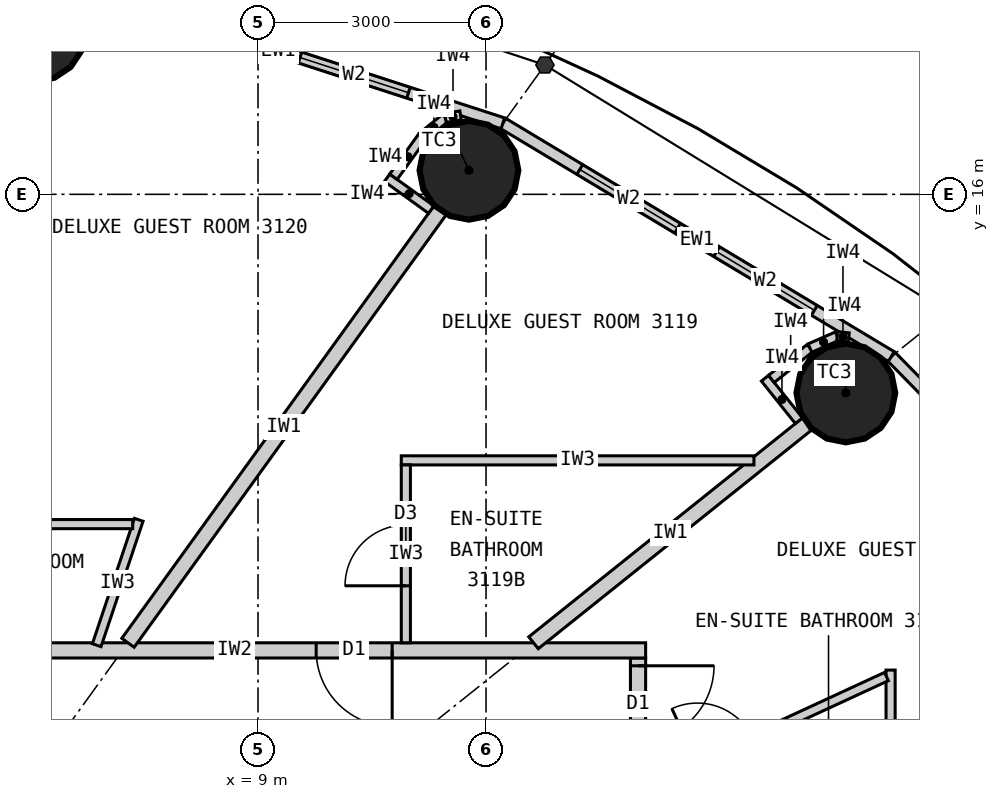
"""IFC4 building model, lengths in metres.
Left out: names, types, materials, properties, quantities, classifications, styles, units other than length and angle.
Written with IfcOpenShell. Run it as: python <this file> out.ifc"""

import sys

from ifc_helpers import new_model, si_unit, direction, frame, frame_2d, origin, origin_2d, place, context, subcontext, project, spatial, rectangle, circle, extrude, element, fill, save


model = new_model("IFC4")
c1 = context("Model", 3, precision=1e-05, world=origin(), true_north=direction((0.0, 1.0)))
c2 = subcontext(c1, "Body", "Model", "MODEL_VIEW")
j1 = project(units=[si_unit("LENGTHUNIT", "METRE"), si_unit("PLANEANGLEUNIT", "RADIAN")], contexts=[c1])
p1 = place(None, origin())
s1 = spatial("IfcSite", under=j1, at=p1, CompositionType="ELEMENT")
p2 = place(p1, origin())
s2 = spatial("IfcBuilding", under=s1, at=p2, CompositionType="ELEMENT")
p3 = place(p2, frame((0.0, 0.0, 122.1)))
s3 = spatial("IfcBuildingStorey", under=s2, at=p3, CompositionType="ELEMENT", Elevation=122.1)
for number, where, z_axis, x_axis in (
    (1, (16.734, 13.387, 0.0), (0.0, 0.0, 1.0), (1.0, 0.0, 0.0)),
    (2, (11.775, 16.316, 0.0), (0.0, 0.0, 1.0), (1.0, 0.0, 0.0)),
    (3, (6.074, 18.135, 0.0), (0.0, 0.0, 1.0), (1.0, 0.0, 0.0)),
):
    element("IfcColumn", number, at=place(p3, frame(where, z_axis=z_axis, x_axis=x_axis)), inside=s3, PredefinedType="COLUMN", context=c2, shape_type="SweptSolid", body=[
        extrude(circle(Radius=0.65, at=origin_2d()), origin(), (0.0, 0.0, 1.0), 3.3),
    ])
p4 = place(p3, frame((21.287, 9.832, 0.0), z_axis=(0.0, 0.0, 1.0), x_axis=(-0.700136650834, 0.714008872605, 0.0)))
e4 = element("IfcWall", 4, at=p4, inside=s3, PredefinedType="ELEMENTEDWALL", context=c2, shape_type="SweptSolid", body=[
    extrude(rectangle(XDim=5.649, YDim=0.15, at=frame_2d((2.825, 0.0))), origin(), (0.0, 0.0, 1.0), 3.12),
])
p5 = place(p4, frame((1.025, 0.0, 0.9)))
e5 = element("IfcOpeningElement", 5, at=p5, cuts=e4, PredefinedType="OPENING", context=c2, shape_type="SweptSolid", body=[
    extrude(rectangle(XDim=1.5, YDim=1.9, at=frame_2d((0.75, 0.95))), frame((0.0, 0.085, 0.0), z_axis=(0.0, -1.0, 0.0), x_axis=(1.0, 0.0, 0.0)), (0.0, 0.0, 1.0), 0.17),
])
p6 = place(p4, frame((3.125, 0.0, 0.9)))
e6 = element("IfcOpeningElement", 6, at=p6, cuts=e4, PredefinedType="OPENING", context=c2, shape_type="SweptSolid", body=[
    extrude(rectangle(XDim=1.5, YDim=1.9, at=frame_2d((0.75, 0.95))), frame((0.0, 0.085, 0.0), z_axis=(0.0, -1.0, 0.0), x_axis=(1.0, 0.0, 0.0)), (0.0, 0.0, 1.0), 0.17),
])
p7 = place(p3, frame((17.332, 13.866, 0.0), z_axis=(0.0, 0.0, 1.0), x_axis=(-0.857308573723, 0.514802884044, 0.0)))
e7 = element("IfcWall", 7, at=p7, inside=s3, PredefinedType="ELEMENTEDWALL", context=c2, shape_type="SweptSolid", body=[
    extrude(rectangle(XDim=5.961, YDim=0.15, at=frame_2d((2.98, 0.0))), origin(), (0.0, 0.0, 1.0), 3.12),
])
p8 = place(p7, frame((1.181, 0.0, 0.9)))
e8 = element("IfcOpeningElement", 8, at=p8, cuts=e7, PredefinedType="OPENING", context=c2, shape_type="SweptSolid", body=[
    extrude(rectangle(XDim=1.5, YDim=1.9, at=frame_2d((0.75, 0.95))), frame((0.0, 0.085, 0.0), z_axis=(0.0, -1.0, 0.0), x_axis=(1.0, 0.0, 0.0)), (0.0, 0.0, 1.0), 0.17),
])
p9 = place(p7, frame((3.281, 0.0, 0.9)))
e9 = element("IfcOpeningElement", 9, at=p9, cuts=e7, PredefinedType="OPENING", context=c2, shape_type="SweptSolid", body=[
    extrude(rectangle(XDim=1.5, YDim=1.9, at=frame_2d((0.75, 0.95))), frame((0.0, 0.085, 0.0), z_axis=(0.0, -1.0, 0.0), x_axis=(1.0, 0.0, 0.0)), (0.0, 0.0, 1.0), 0.17),
])
p10 = place(p3, frame((12.221, 16.935, 0.0), z_axis=(0.0, 0.0, 1.0), x_axis=(-0.951272691506, 0.308350881944, 0.0)))
e10 = element("IfcWall", 10, at=p10, inside=s3, PredefinedType="ELEMENTEDWALL", context=c2, shape_type="SweptSolid", body=[
    extrude(rectangle(XDim=6.211, YDim=0.15, at=frame_2d((3.105, 0.0))), origin(), (0.0, 0.0, 1.0), 3.12),
])
p11 = place(p10, frame((1.305, 0.0, 0.9)))
e11 = element("IfcOpeningElement", 11, at=p11, cuts=e10, PredefinedType="OPENING", context=c2, shape_type="SweptSolid", body=[
    extrude(rectangle(XDim=1.5, YDim=1.9, at=frame_2d((0.75, 0.95))), frame((0.0, 0.085, 0.0), z_axis=(0.0, -1.0, 0.0), x_axis=(1.0, 0.0, 0.0)), (0.0, 0.0, 1.0), 0.17),
])
p12 = place(p10, frame((3.405, 0.0, 0.9)))
e12 = element("IfcOpeningElement", 12, at=p12, cuts=e10, PredefinedType="OPENING", context=c2, shape_type="SweptSolid", body=[
    extrude(rectangle(XDim=1.5, YDim=1.9, at=frame_2d((0.75, 0.95))), frame((0.0, 0.085, 0.0), z_axis=(0.0, -1.0, 0.0), x_axis=(1.0, 0.0, 0.0)), (0.0, 0.0, 1.0), 0.17),
])
p13 = place(p3, frame((14.0, -9.9, 0.0), z_axis=(0.0, 0.0, 1.0), x_axis=(0.0, 1.0, 0.0)))
e13 = element("IfcWall", 13, at=p13, inside=s3, PredefinedType="PARTITIONING", context=c2, shape_type="SweptSolid", body=[
    extrude(rectangle(XDim=19.8, YDim=0.2, at=frame_2d((9.9, 0.0))), origin(), (0.0, 0.0, 1.0), 3.12),
])
p14 = place(p13, frame((2.478, 0.0, 0.0)))
e14 = element("IfcOpeningElement", 14, at=p14, cuts=e13, PredefinedType="OPENING", context=c2, shape_type="SweptSolid", body=[
    extrude(rectangle(XDim=1.0, YDim=2.2, at=frame_2d((0.5, 1.1))), frame((0.0, 0.11, 0.0), z_axis=(0.0, -1.0, 0.0), x_axis=(1.0, 0.0, 0.0)), (0.0, 0.0, 1.0), 0.22),
])
p15 = place(p13, frame((8.838, 0.0, 0.0)))
e15 = element("IfcOpeningElement", 15, at=p15, cuts=e13, PredefinedType="OPENING", context=c2, shape_type="SweptSolid", body=[
    extrude(rectangle(XDim=1.0, YDim=2.2, at=frame_2d((0.5, 1.1))), frame((0.0, 0.11, 0.0), z_axis=(0.0, -1.0, 0.0), x_axis=(1.0, 0.0, 0.0)), (0.0, 0.0, 1.0), 0.22),
])
p16 = place(p13, frame((13.742, 0.0, 0.0)))
e16 = element("IfcOpeningElement", 16, at=p16, cuts=e13, PredefinedType="OPENING", context=c2, shape_type="SweptSolid", body=[
    extrude(rectangle(XDim=1.0, YDim=2.2, at=frame_2d((0.5, 1.1))), frame((0.0, 0.11, 0.0), z_axis=(0.0, -1.0, 0.0), x_axis=(1.0, 0.0, 0.0)), (0.0, 0.0, 1.0), 0.22),
])
p17 = place(p13, frame((18.698, 0.0, 0.0)))
e17 = element("IfcOpeningElement", 17, at=p17, cuts=e13, PredefinedType="OPENING", context=c2, shape_type="SweptSolid", body=[
    extrude(rectangle(XDim=1.0, YDim=2.2, at=frame_2d((0.5, 1.1))), frame((0.0, 0.11, 0.0), z_axis=(0.0, -1.0, 0.0), x_axis=(1.0, 0.0, 0.0)), (0.0, 0.0, 1.0), 0.22),
])
p18 = place(p3, frame((3.283, 10.0, 0.0), z_axis=(0.0, 0.0, 1.0), x_axis=(1.0, 0.0, 0.0)))
e18 = element("IfcWall", 18, at=p18, inside=s3, PredefinedType="PARTITIONING", context=c2, shape_type="SweptSolid", body=[
    extrude(rectangle(XDim=10.817, YDim=0.2, at=frame_2d((5.409, 0.0))), origin(), (0.0, 0.0, 1.0), 3.12),
])
p19 = place(p18, frame((6.482, 0.0, 0.0)))
e19 = element("IfcOpeningElement", 19, at=p19, cuts=e18, PredefinedType="OPENING", context=c2, shape_type="SweptSolid", body=[
    extrude(rectangle(XDim=1.0, YDim=2.2, at=frame_2d((0.5, 1.1))), frame((0.0, 0.11, 0.0), z_axis=(0.0, -1.0, 0.0), x_axis=(1.0, 0.0, 0.0)), (0.0, 0.0, 1.0), 0.22),
])
p20 = place(p3, frame((14.1, 6.512, 0.0), z_axis=(0.0, 0.0, 1.0), x_axis=(0.907833019998, 0.419331858797, 0.0)))
e20 = element("IfcWall", 20, at=p20, inside=s3, PredefinedType="PARTITIONING", context=c2, shape_type="SweptSolid", body=[
    extrude(rectangle(XDim=6.505, YDim=0.2, at=frame_2d((3.252, 0.0))), origin(), (0.0, 0.0, 1.0), 2.27),
])
p21 = place(p3, frame((12.625, 10.1, 0.0), z_axis=(0.0, 0.0, 1.0), x_axis=(0.780863644897, 0.624701503182, 0.0)))
e21 = element("IfcWall", 21, at=p21, inside=s3, PredefinedType="PARTITIONING", context=c2, shape_type="SweptSolid", body=[
    extrude(rectangle(XDim=4.612, YDim=0.2, at=frame_2d((2.306, 0.0))), origin(), (0.0, 0.0, 1.0), 2.37),
])
p22 = place(p3, frame((7.289, 10.1, 0.0), z_axis=(0.0, 0.0, 1.0), x_axis=(0.585217367024, 0.81087645997, 0.0)))
e22 = element("IfcWall", 22, at=p22, inside=s3, PredefinedType="PARTITIONING", context=c2, shape_type="SweptSolid", body=[
    extrude(rectangle(XDim=7.016, YDim=0.2, at=frame_2d((3.508, 0.0))), origin(), (0.0, 0.0, 1.0), 2.37),
])
p23 = place(p3, frame((17.323, 8.101, 0.0), z_axis=(0.0, 0.0, 1.0), x_axis=(0.0, 1.0, 0.0)))
e23 = element("IfcWall", 23, at=p23, inside=s3, PredefinedType="PARTITIONING", context=c2, shape_type="SweptSolid", body=[
    extrude(rectangle(XDim=1.64, YDim=0.12, at=frame_2d((0.82, 0.0))), origin(), (0.0, 0.0, 1.0), 3.12),
])
p24 = place(p3, frame((14.1, 8.193, 0.0), z_axis=(0.0, 0.0, 1.0), x_axis=(0.907836493557, 0.419324338628, 0.0)))
e24 = element("IfcWall", 24, at=p24, inside=s3, PredefinedType="PARTITIONING", context=c2, shape_type="SweptSolid", body=[
    extrude(rectangle(XDim=3.49, YDim=0.12, at=frame_2d((1.745, 0.0))), origin(), (0.0, 0.0, 1.0), 3.12),
])
p25 = place(p24, frame((0.75, 0.0, 0.0)))
e25 = element("IfcOpeningElement", 25, at=p25, cuts=e24, PredefinedType="OPENING", context=c2, shape_type="SweptSolid", body=[
    extrude(rectangle(XDim=0.8, YDim=2.1, at=frame_2d((0.4, 1.05))), frame((0.0, 0.07, 0.0), z_axis=(0.0, -1.0, 0.0), x_axis=(1.0, 0.0, 0.0)), (0.0, 0.0, 1.0), 0.14),
])
p26 = place(p3, frame((15.525, 12.5, 0.0), z_axis=(0.0, 0.0, 1.0), x_axis=(-1.0, 0.0, 0.0)))
e26 = element("IfcWall", 26, at=p26, inside=s3, PredefinedType="PARTITIONING", context=c2, shape_type="SweptSolid", body=[
    extrude(rectangle(XDim=4.64, YDim=0.12, at=frame_2d((2.32, 0.0))), origin(), (0.0, 0.0, 1.0), 3.12),
])
p27 = place(p3, frame((10.945, 10.1, 0.0), z_axis=(0.0, 0.0, 1.0), x_axis=(0.0, 1.0, 0.0)))
e27 = element("IfcWall", 27, at=p27, inside=s3, PredefinedType="PARTITIONING", context=c2, shape_type="SweptSolid", body=[
    extrude(rectangle(XDim=2.34, YDim=0.12, at=frame_2d((1.17, 0.0))), origin(), (0.0, 0.0, 1.0), 3.12),
])
p28 = place(p27, frame((0.75, 0.0, 0.0)))
e28 = element("IfcOpeningElement", 28, at=p28, cuts=e27, PredefinedType="OPENING", context=c2, shape_type="SweptSolid", body=[
    extrude(rectangle(XDim=0.8, YDim=2.1, at=frame_2d((0.4, 1.05))), frame((0.0, 0.07, 0.0), z_axis=(0.0, -1.0, 0.0), x_axis=(1.0, 0.0, 0.0)), (0.0, 0.0, 1.0), 0.14),
])
p29 = place(p3, frame((6.878, 10.068, 0.0), z_axis=(0.0, 0.0, 1.0), x_axis=(0.317532394508, 0.948247424694, 0.0)))
e29 = element("IfcWall", 29, at=p29, inside=s3, PredefinedType="PARTITIONING", context=c2, shape_type="SweptSolid", body=[
    extrude(rectangle(XDim=1.74, YDim=0.12, at=frame_2d((0.87, 0.0))), origin(), (0.0, 0.0, 1.0), 3.12),
])
p30 = place(p3, frame((4.011, 11.661, 0.0), z_axis=(0.0, 0.0, 1.0), x_axis=(1.0, 0.0, 0.0)))
e30 = element("IfcWall", 30, at=p30, inside=s3, PredefinedType="PARTITIONING", context=c2, shape_type="SweptSolid", body=[
    extrude(rectangle(XDim=3.34, YDim=0.12, at=frame_2d((1.67, 0.0))), origin(), (0.0, 0.0, 1.0), 3.12),
])
p31 = place(p30, frame((0.75, 0.0, 0.0)))
e31 = element("IfcOpeningElement", 31, at=p31, cuts=e30, PredefinedType="OPENING", context=c2, shape_type="SweptSolid", body=[
    extrude(rectangle(XDim=0.8, YDim=2.1, at=frame_2d((0.4, 1.05))), frame((0.0, 0.07, 0.0), z_axis=(0.0, -1.0, 0.0), x_axis=(1.0, 0.0, 0.0)), (0.0, 0.0, 1.0), 0.14),
])
p32 = place(p3, frame((16.117, 13.022, 0.0), z_axis=(0.0, 0.0, 1.0), x_axis=(-0.62465344249, 0.780902091677, 0.0)))
e32 = element("IfcWall", 32, at=p32, inside=s3, PredefinedType="PARTITIONING", context=c2, shape_type="SweptSolid", body=[
    extrude(rectangle(XDim=0.716, YDim=0.12, at=frame_2d((0.358, 0.0))), origin(), (0.0, 0.0, 1.0), 3.12),
])
p33 = place(p3, frame((15.754, 13.571, 0.0), z_axis=(0.0, 0.0, 1.0), x_axis=(0.780905453553, 0.624649239663, 0.0)))
e33 = element("IfcWall", 33, at=p33, inside=s3, PredefinedType="PARTITIONING", context=c2, shape_type="SweptSolid", body=[
    extrude(rectangle(XDim=0.65, YDim=0.12, at=frame_2d((0.325, 0.0))), origin(), (0.0, 0.0, 1.0), 3.12),
])
p34 = place(p3, frame((16.262, 13.977, 0.0), z_axis=(0.0, 0.0, 1.0), x_axis=(0.915985403703, 0.401211590314, 0.0)))
e34 = element("IfcWall", 34, at=p34, inside=s3, PredefinedType="PARTITIONING", context=c2, shape_type="SweptSolid", body=[
    extrude(rectangle(XDim=0.391, YDim=0.12, at=frame_2d((0.196, 0.0))), origin(), (0.0, 0.0, 1.0), 3.12),
])
p35 = place(p3, frame((16.62, 14.134, 0.0), z_axis=(0.0, 0.0, 1.0), x_axis=(0.993941871493, -0.109907033867, 0.0)))
e35 = element("IfcWall", 35, at=p35, inside=s3, PredefinedType="PARTITIONING", context=c2, shape_type="SweptSolid", body=[
    extrude(rectangle(XDim=0.153, YDim=0.12, at=frame_2d((0.077, 0.0))), origin(), (0.0, 0.0, 1.0), 3.12),
])
p36 = place(p3, frame((11.279, 15.799, 0.0), z_axis=(0.0, 0.0, 1.0), x_axis=(-0.810912957127, 0.585166793285, 0.0)))
e36 = element("IfcWall", 36, at=p36, inside=s3, PredefinedType="PARTITIONING", context=c2, shape_type="SweptSolid", body=[
    extrude(rectangle(XDim=0.716, YDim=0.12, at=frame_2d((0.358, 0.0))), origin(), (0.0, 0.0, 1.0), 3.12),
])
p37 = place(p3, frame((10.782, 16.231, 0.0), z_axis=(0.0, 0.0, 1.0), x_axis=(0.585175102182, 0.810906961239, 0.0)))
e37 = element("IfcWall", 37, at=p37, inside=s3, PredefinedType="PARTITIONING", context=c2, shape_type="SweptSolid", body=[
    extrude(rectangle(XDim=0.65, YDim=0.12, at=frame_2d((0.325, 0.0))), origin(), (0.0, 0.0, 1.0), 3.12),
])
p38 = place(p3, frame((11.162, 16.759, 0.0), z_axis=(0.0, 0.0, 1.0), x_axis=(0.775178428527, 0.63174235567, 0.0)))
e38 = element("IfcWall", 38, at=p38, inside=s3, PredefinedType="PARTITIONING", context=c2, shape_type="SweptSolid", body=[
    extrude(rectangle(XDim=0.392, YDim=0.12, at=frame_2d((0.196, 0.0))), origin(), (0.0, 0.0, 1.0), 3.12),
])
p39 = place(p3, frame((11.466, 17.006, 0.0), z_axis=(0.0, 0.0, 1.0), x_axis=(0.987228877621, 0.15930832744, 0.0)))
e39 = element("IfcWall", 39, at=p39, inside=s3, PredefinedType="PARTITIONING", context=c2, shape_type="SweptSolid", body=[
    extrude(rectangle(XDim=0.202, YDim=0.12, at=frame_2d((0.101, 0.0))), origin(), (0.0, 0.0, 1.0), 3.12),
])
p40 = place(p8, origin())
e40 = element("IfcWindow", 40, at=p40, inside=s3, PartitioningType="SINGLE_PANEL", PredefinedType="WINDOW", context=c2, shape_type="SweptSolid", body=[
    extrude(rectangle(XDim=1.5, YDim=1.9, at=frame_2d((0.75, 0.95))), frame((0.0, 0.03, 0.0), z_axis=(0.0, -1.0, 0.0), x_axis=(1.0, 0.0, 0.0)), (0.0, 0.0, 1.0), 0.06),
])
fill(e8, e40)
p41 = place(p9, origin())
e41 = element("IfcWindow", 41, at=p41, inside=s3, PartitioningType="SINGLE_PANEL", PredefinedType="WINDOW", context=c2, shape_type="SweptSolid", body=[
    extrude(rectangle(XDim=1.5, YDim=1.9, at=frame_2d((0.75, 0.95))), frame((0.0, 0.03, 0.0), z_axis=(0.0, -1.0, 0.0), x_axis=(1.0, 0.0, 0.0)), (0.0, 0.0, 1.0), 0.06),
])
fill(e9, e41)
p42 = place(p11, origin())
e42 = element("IfcWindow", 42, at=p42, inside=s3, PartitioningType="SINGLE_PANEL", PredefinedType="WINDOW", context=c2, shape_type="SweptSolid", body=[
    extrude(rectangle(XDim=1.5, YDim=1.9, at=frame_2d((0.75, 0.95))), frame((0.0, 0.03, 0.0), z_axis=(0.0, -1.0, 0.0), x_axis=(1.0, 0.0, 0.0)), (0.0, 0.0, 1.0), 0.06),
])
fill(e11, e42)
p43 = place(p17, origin())
e43 = element("IfcDoor", 43, at=p43, inside=s3, OperationType="SINGLE_SWING_RIGHT", PredefinedType="DOOR", context=c2, shape_type="SweptSolid", body=[
    extrude(rectangle(XDim=1.0, YDim=2.2, at=frame_2d((0.5, 1.1))), frame((0.0, 0.025, 0.0), z_axis=(0.0, -1.0, 0.0), x_axis=(1.0, 0.0, 0.0)), (0.0, 0.0, 1.0), 0.05),
])
fill(e17, e43)
p44 = place(p28, origin())
e44 = element("IfcDoor", 44, at=p44, inside=s3, OperationType="SINGLE_SWING_LEFT", PredefinedType="DOOR", context=c2, shape_type="SweptSolid", body=[
    extrude(rectangle(XDim=0.8, YDim=2.1, at=frame_2d((0.4, 1.05))), frame((0.0, 0.025, 0.0), z_axis=(0.0, -1.0, 0.0), x_axis=(1.0, 0.0, 0.0)), (0.0, 0.0, 1.0), 0.05),
])
fill(e28, e44)
p45 = place(p19, origin())
e45 = element("IfcDoor", 45, at=p45, inside=s3, OperationType="SINGLE_SWING_RIGHT", PredefinedType="DOOR", context=c2, shape_type="SweptSolid", body=[
    extrude(rectangle(XDim=1.0, YDim=2.2, at=frame_2d((0.5, 1.1))), frame((0.0, 0.025, 0.0), z_axis=(0.0, -1.0, 0.0), x_axis=(1.0, 0.0, 0.0)), (0.0, 0.0, 1.0), 0.05),
])
fill(e19, e45)
save(model, sys.argv[1])
